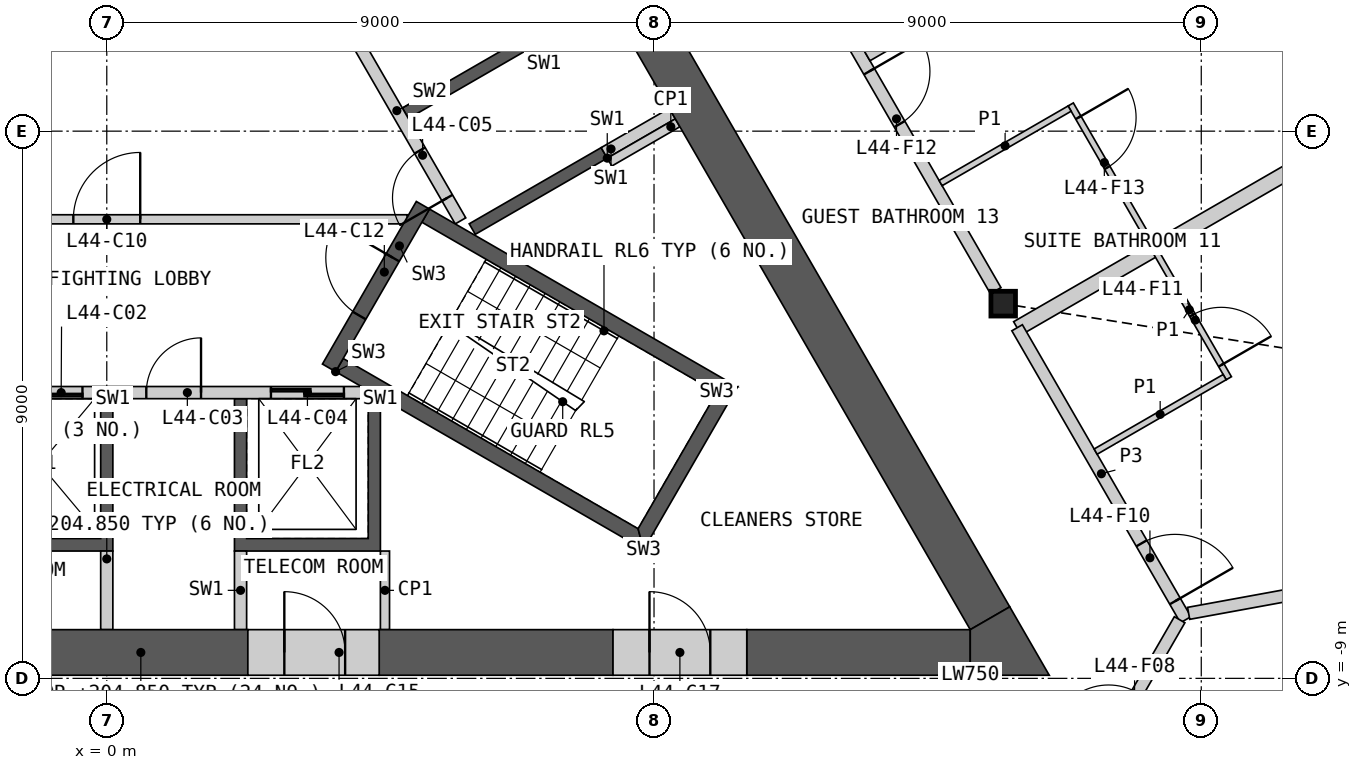
"""IFC4 building model, lengths in metres.
Left out: names, types, materials, properties, quantities, classifications, styles, units other than length and angle.
Written with IfcOpenShell. Run it as: python <this file> out.ifc"""

import sys

from ifc_helpers import new_model, si_unit, direction, frame, frame_2d, origin, origin_2d, place, context, subcontext, project, spatial, polyline, rectangle, i_section, outline, extrude, element, fill, save


model = new_model("IFC4")
c1 = context("Model", 3, precision=1e-05, world=origin(), true_north=direction((0.0, 1.0)))
c2 = subcontext(c1, "Body", "Model", "MODEL_VIEW")
j1 = project(units=[si_unit("LENGTHUNIT", "METRE"), si_unit("PLANEANGLEUNIT", "RADIAN")], contexts=[c1])
p1 = place(None, origin())
s1 = spatial("IfcSite", under=j1, at=p1, CompositionType="ELEMENT")
p2 = place(p1, origin())
s2 = spatial("IfcBuilding", under=s1, at=p2, CompositionType="ELEMENT")
p3 = place(p2, frame((0.0, 0.0, 201.6)))
s3 = spatial("IfcBuildingStorey", under=s2, at=p3, CompositionType="ELEMENT", Elevation=201.6)
p4 = place(p3, frame((14.743, -2.837, 0.0), z_axis=(0.0, 0.0, 1.0), x_axis=(1.0, 0.0, 0.0)))
e1 = element("IfcColumn", 1, at=p4, inside=s3, PredefinedType="COLUMN", context=c2, shape_type="SweptSolid", body=[
    extrude(i_section(OverallWidth=0.404, OverallDepth=0.407, WebThickness=0.027, FlangeThickness=0.044, at=origin_2d()), origin(), (0.0, 0.0, 1.0), 3.6),
])
p5 = place(p3, origin())
e2 = element("IfcWall", 2, at=p5, inside=s3, PredefinedType="SHEAR", context=c2, shape_type="SweptSolid", body=[
    extrude(outline(polyline([(4.5, -4.4), (4.5, -6.906), (2.1, -6.906), (2.1, -4.4), (2.3, -4.4), (2.3, -6.7), (4.3, -6.7), (4.3, -4.4), (4.5, -4.4)])), origin(), (0.0, 0.0, 1.0), 3.25),
])
p6 = place(p3, origin())
e3 = element("IfcWall", 3, at=p6, inside=s3, PredefinedType="SHEAR", context=c2, shape_type="SweptSolid", body=[
    extrude(outline(polyline([(0.1, -4.4), (0.1, -6.906), (-4.5, -6.906), (-4.5, -4.4), (-4.3, -4.4), (-4.3, -6.7), (-2.3, -6.7), (-2.3, -4.4), (-2.1, -4.4), (-2.1, -6.7), (-0.1, -6.7), (-0.1, -4.4), (0.1, -4.4)])), origin(), (0.0, 0.0, 1.0), 3.25),
])
p7 = place(p3, frame((-4.187, -4.3, 0.0), z_axis=(0.0, 0.0, 1.0), x_axis=(1.0, 0.0, 0.0)))
e4 = element("IfcWall", 4, at=p7, inside=s3, PredefinedType="SOLIDWALL", context=c2, shape_type="SweptSolid", body=[
    extrude(rectangle(XDim=8.373, YDim=0.2, at=frame_2d((4.187, 0.0))), origin(), (0.0, 0.0, 1.0), 3.25),
])
p8 = place(p7, frame((0.287, 0.0, 0.0)))
e5 = element("IfcOpeningElement", 5, at=p8, cuts=e4, PredefinedType="OPENING", context=c2, shape_type="SweptSolid", body=[
    extrude(rectangle(XDim=1.2, YDim=2.1, at=frame_2d((0.6, 1.05))), frame((0.0, 0.11, 0.0), z_axis=(0.0, -1.0, 0.0), x_axis=(1.0, 0.0, 0.0)), (0.0, 0.0, 1.0), 0.22),
])
p9 = place(p7, frame((2.387, 0.0, 0.0)))
e6 = element("IfcOpeningElement", 6, at=p9, cuts=e4, PredefinedType="OPENING", context=c2, shape_type="SweptSolid", body=[
    extrude(rectangle(XDim=1.4, YDim=2.1, at=frame_2d((0.7, 1.05))), frame((0.0, 0.11, 0.0), z_axis=(0.0, -1.0, 0.0), x_axis=(1.0, 0.0, 0.0)), (0.0, 0.0, 1.0), 0.22),
])
p10 = place(p7, frame((4.837, 0.0, 0.0)))
e7 = element("IfcOpeningElement", 7, at=p10, cuts=e4, PredefinedType="OPENING", context=c2, shape_type="SweptSolid", body=[
    extrude(rectangle(XDim=0.9, YDim=2.1, at=frame_2d((0.45, 1.05))), frame((0.0, 0.11, 0.0), z_axis=(0.0, -1.0, 0.0), x_axis=(1.0, 0.0, 0.0)), (0.0, 0.0, 1.0), 0.22),
])
p11 = place(p7, frame((6.887, 0.0, 0.0)))
e8 = element("IfcOpeningElement", 8, at=p11, cuts=e4, PredefinedType="OPENING", context=c2, shape_type="SweptSolid", body=[
    extrude(rectangle(XDim=1.2, YDim=2.1, at=frame_2d((0.6, 1.05))), frame((0.0, 0.11, 0.0), z_axis=(0.0, -1.0, 0.0), x_axis=(1.0, 0.0, 0.0)), (0.0, 0.0, 1.0), 0.22),
])
for number, where, z_axis, x_axis in (
    (9, (0.0, -6.906, 0.0), (0.0, 0.0, 1.0), (0.0, -1.0, 0.0)),
    (10, (2.2, -6.906, 0.0), (0.0, 0.0, 1.0), (0.0, -1.0, 0.0)),
):
    element("IfcWall", number, at=place(p3, frame(where, z_axis=z_axis, x_axis=x_axis)), inside=s3, PredefinedType="SHEAR", context=c2, shape_type="SweptSolid", body=[
        extrude(rectangle(XDim=1.293, YDim=0.2, at=frame_2d((0.646, 0.0))), origin(), (0.0, 0.0, 1.0), 3.25),
    ])
p12 = place(p3, origin())
e11 = element("IfcWall", 11, at=p12, inside=s3, PredefinedType="SHEAR", context=c2, shape_type="SweptSolid", body=[
    extrude(outline(polyline([(1.561, 6.097), (3.731, 7.35), (7.131, 1.461), (4.96, 0.208), (4.861, 0.381), (6.852, 1.531), (4.752, 5.169), (2.76, 4.019), (2.66, 4.192), (4.652, 5.342), (3.652, 7.074), (1.66, 5.924), (1.561, 6.097)])), origin(), (0.0, 0.0, 1.0), 3.25),
])
p13 = place(p3, origin())
e12 = element("IfcWall", 12, at=p13, inside=s3, PredefinedType="SHEAR", context=c2, shape_type="SweptSolid", body=[
    extrude(outline(polyline([(8.231, -0.444), (6.061, -1.697), (5.96, -1.524), (8.131, -0.271), (8.231, -0.444)])), origin(), (0.0, 0.0, 1.0), 3.25),
])
p14 = place(p3, frame((5.817, -1.476, 0.0), z_axis=(0.0, 0.0, 1.0), x_axis=(-0.500002616675, 0.866023893041, 0.0)))
e13 = element("IfcWall", 13, at=p14, inside=s3, PredefinedType="SOLIDWALL", context=c2, shape_type="SweptSolid", body=[
    extrude(rectangle(XDim=8.373, YDim=0.2, at=frame_2d((4.187, 0.0))), origin(), (0.0, 0.0, 1.0), 3.25),
])
p15 = place(p14, frame((0.437, 0.0, 0.0)))
e14 = element("IfcOpeningElement", 14, at=p15, cuts=e13, PredefinedType="OPENING", context=c2, shape_type="SweptSolid", body=[
    extrude(rectangle(XDim=0.9, YDim=2.1, at=frame_2d((0.45, 1.05))), frame((0.0, 0.11, 0.0), z_axis=(0.0, -1.0, 0.0), x_axis=(1.0, 0.0, 0.0)), (0.0, 0.0, 1.0), 0.22),
])
p16 = place(p14, frame((3.737, 0.0, 0.0)))
e15 = element("IfcOpeningElement", 15, at=p16, cuts=e13, PredefinedType="OPENING", context=c2, shape_type="SweptSolid", body=[
    extrude(rectangle(XDim=0.9, YDim=2.1, at=frame_2d((0.45, 1.05))), frame((0.0, 0.11, 0.0), z_axis=(0.0, -1.0, 0.0), x_axis=(1.0, 0.0, 0.0)), (0.0, 0.0, 1.0), 0.22),
])
p17 = place(p14, frame((6.937, 0.0, 0.0)))
e16 = element("IfcOpeningElement", 16, at=p17, cuts=e13, PredefinedType="OPENING", context=c2, shape_type="SweptSolid", body=[
    extrude(rectangle(XDim=1.1, YDim=2.1, at=frame_2d((0.55, 1.05))), frame((0.0, 0.11, 0.0), z_axis=(0.0, -1.0, 0.0), x_axis=(1.0, 0.0, 0.0)), (0.0, 0.0, 1.0), 0.22),
])
p18 = place(p3, frame((8.181, -0.357, 0.0), z_axis=(0.0, 0.0, 1.0), x_axis=(0.866003189247, 0.500038474733, 0.0)))
e17 = element("IfcWall", 17, at=p18, inside=s3, PredefinedType="SHEAR", context=c2, shape_type="SweptSolid", body=[
    extrude(rectangle(XDim=1.293, YDim=0.2, at=frame_2d((0.646, 0.0))), origin(), (0.0, 0.0, 1.0), 3.25),
])
p19 = place(p3, frame((-4.941, -1.45, 0.0), z_axis=(0.0, 0.0, 1.0), x_axis=(1.0, 0.0, 0.0)))
e18 = element("IfcWall", 18, at=p19, inside=s3, PredefinedType="PARTITIONING", context=c2, shape_type="SweptSolid", body=[
    extrude(rectangle(XDim=9.882, YDim=0.15, at=frame_2d((4.941, 0.0))), origin(), (0.0, 0.0, 1.0), 3.25),
])
p20 = place(p19, frame((4.391, 0.0, 0.0)))
e19 = element("IfcOpeningElement", 19, at=p20, cuts=e18, PredefinedType="OPENING", context=c2, shape_type="SweptSolid", body=[
    extrude(rectangle(XDim=1.1, YDim=2.1, at=frame_2d((0.55, 1.05))), frame((0.0, 0.085, 0.0), z_axis=(0.0, -1.0, 0.0), x_axis=(1.0, 0.0, 0.0)), (0.0, 0.0, 1.0), 0.17),
])
p21 = place(p3, origin())
e20 = element("IfcWall", 20, at=p21, inside=s3, PredefinedType="SHEAR", context=c2, shape_type="SweptSolid", body=[
    extrude(outline(polyline([(3.763, -3.956), (8.83, -6.881), (8.738, -6.539), (3.888, -3.739), (3.763, -3.956)])), origin(), (0.0, 0.0, 1.0), 3.25),
])
p22 = place(p3, origin())
e21 = element("IfcWall", 21, at=p22, inside=s3, PredefinedType="SHEAR", context=c2, shape_type="SweptSolid", body=[
    extrude(outline(polyline([(8.83, -6.881), (10.374, -4.206), (10.032, -4.298), (8.738, -6.539), (8.83, -6.881)])), origin(), (0.0, 0.0, 1.0), 3.25),
])
p23 = place(p3, origin())
e22 = element("IfcWall", 22, at=p23, inside=s3, PredefinedType="SHEAR", context=c2, shape_type="SweptSolid", body=[
    extrude(outline(polyline([(10.032, -4.298), (10.374, -4.206), (5.307, -1.281), (5.182, -1.498), (10.032, -4.298)])), origin(), (0.0, 0.0, 1.0), 3.25),
])
p24 = place(p3, frame((3.655, -3.893, 0.0), z_axis=(0.0, 0.0, 1.0), x_axis=(0.499982516597, 0.866035497597, 0.0)))
e23 = element("IfcWall", 23, at=p24, inside=s3, PredefinedType="SHEAR", context=c2, shape_type="SweptSolid", body=[
    extrude(rectangle(XDim=3.088, YDim=0.25, at=frame_2d((1.544, 0.0))), origin(), (0.0, 0.0, 1.0), 3.25),
])
p25 = place(p24, frame((0.994, 0.0, 0.0)))
e24 = element("IfcOpeningElement", 24, at=p25, cuts=e23, PredefinedType="OPENING", context=c2, shape_type="SweptSolid", body=[
    extrude(rectangle(XDim=1.1, YDim=2.1, at=frame_2d((0.55, 1.05))), frame((0.0, 0.135, 0.0), z_axis=(0.0, -1.0, 0.0), x_axis=(1.0, 0.0, 0.0)), (0.0, 0.0, 1.0), 0.27),
])
for number, where, z_axis, x_axis in (
    (25, (4.575, -6.906, 0.0), (0.0, 0.0, 1.0), (0.0, -1.0, 0.0)),
    (26, (8.268, -0.509, 0.0), (0.0, 0.0, 1.0), (0.866, 0.5, 0.0)),
):
    element("IfcWall", number, at=place(p3, frame(where, z_axis=z_axis, x_axis=x_axis)), inside=s3, PredefinedType="PARTITIONING", context=c2, shape_type="SweptSolid", body=[
        extrude(rectangle(XDim=1.293, YDim=0.15, at=frame_2d((0.646, 0.0))), origin(), (0.0, 0.0, 1.0), 3.25),
    ])
p26 = place(p3, frame((4.48, -8.574, 0.0), z_axis=(0.0, 0.0, 1.0), x_axis=(1.0, 0.0, 0.0)))
e27 = element("IfcWall", 27, at=p26, inside=s3, PredefinedType="SHEAR", context=c2, shape_type="SweptSolid", body=[
    extrude(rectangle(XDim=3.845, YDim=0.75, at=frame_2d((1.923, 0.0))), origin(), (0.0, 0.0, 1.0), 3.25),
])
p27 = place(p3, frame((10.525, -8.574, 0.0), z_axis=(0.0, 0.0, 1.0), x_axis=(1.0, 0.0, 0.0)))
e28 = element("IfcWall", 28, at=p27, inside=s3, PredefinedType="SHEAR", context=c2, shape_type="SweptSolid", body=[
    extrude(rectangle(XDim=3.676, YDim=0.75, at=frame_2d((1.838, 0.0))), origin(), (0.0, 0.0, 1.0), 3.25),
])
p28 = place(p3, frame((-1.2, -8.574, 0.0), z_axis=(0.0, 0.0, 1.0), x_axis=(1.0, 0.0, 0.0)))
e29 = element("IfcWall", 29, at=p28, inside=s3, PredefinedType="SHEAR", context=c2, shape_type="SweptSolid", body=[
    extrude(rectangle(XDim=3.52, YDim=0.75, at=frame_2d((1.76, 0.0))), origin(), (0.0, 0.0, 1.0), 3.25),
])
p29 = place(p3, frame((14.526, -8.011, 0.0), z_axis=(0.0, 0.0, 1.0), x_axis=(-0.499996012963, 0.866027705689, 0.0)))
e30 = element("IfcWall", 30, at=p29, inside=s3, PredefinedType="SHEAR", context=c2, shape_type="SweptSolid", body=[
    extrude(rectangle(XDim=15.039, YDim=0.75, at=frame_2d((7.519, 0.0))), origin(), (0.0, 0.0, 1.0), 3.25),
])
p30 = place(p3, origin())
e31 = element("IfcWall", 31, at=p30, inside=s3, PredefinedType="SHEAR", context=c2, shape_type="SweptSolid", body=[
    extrude(outline(polyline([(14.201, -8.949), (14.201, -8.199), (14.851, -7.824), (15.5, -8.949), (14.201, -8.949)])), origin(), (0.0, 0.0, 1.0), 3.25),
])
p31 = place(p3, frame((2.32, -8.574, 0.0), z_axis=(0.0, 0.0, 1.0), x_axis=(1.0, 0.0, 0.0)))
e32 = element("IfcWall", 32, at=p31, inside=s3, PredefinedType="SHEAR", context=c2, shape_type="SweptSolid", body=[
    extrude(rectangle(XDim=2.16, YDim=0.75, at=frame_2d((1.08, 0.0))), origin(), (0.0, 0.0, 1.0), 3.25),
])
p32 = place(p31, frame((0.6, 0.0, 0.0)))
e33 = element("IfcOpeningElement", 33, at=p32, cuts=e32, PredefinedType="OPENING", context=c2, shape_type="SweptSolid", body=[
    extrude(rectangle(XDim=1.0, YDim=2.1, at=frame_2d((0.5, 1.05))), frame((0.0, 0.385, 0.0), z_axis=(0.0, -1.0, 0.0), x_axis=(1.0, 0.0, 0.0)), (0.0, 0.0, 1.0), 0.77),
])
p33 = place(p3, frame((8.325, -8.574, 0.0), z_axis=(0.0, 0.0, 1.0), x_axis=(1.0, 0.0, 0.0)))
e34 = element("IfcWall", 34, at=p33, inside=s3, PredefinedType="SHEAR", context=c2, shape_type="SweptSolid", body=[
    extrude(rectangle(XDim=2.2, YDim=0.75, at=frame_2d((1.1, 0.0))), origin(), (0.0, 0.0, 1.0), 3.25),
])
p34 = place(p33, frame((0.6, 0.0, 0.0)))
e35 = element("IfcOpeningElement", 35, at=p34, cuts=e34, PredefinedType="OPENING", context=c2, shape_type="SweptSolid", body=[
    extrude(rectangle(XDim=1.0, YDim=2.1, at=frame_2d((0.5, 1.05))), frame((0.0, 0.385, 0.0), z_axis=(0.0, -1.0, 0.0), x_axis=(1.0, 0.0, 0.0)), (0.0, 0.0, 1.0), 0.77),
])
p35 = place(p3, frame((14.977, -3.242, 0.0), z_axis=(0.0, 0.0, 1.0), x_axis=(0.866026026416, 0.499998921569, 0.0)))
e36 = element("IfcWall", 36, at=p35, inside=s3, PredefinedType="PARTITIONING", context=c2, shape_type="SweptSolid", body=[
    extrude(rectangle(XDim=12.918, YDim=0.25, at=frame_2d((6.459, 0.0))), origin(), (0.0, 0.0, 1.0), 2.404),
])
p36 = place(p3, frame((9.952, 5.461, 0.0), z_axis=(0.0, 0.0, 1.0), x_axis=(0.50000393355, -0.866023132736, 0.0)))
e37 = element("IfcWall", 37, at=p36, inside=s3, PredefinedType="PARTITIONING", context=c2, shape_type="SweptSolid", body=[
    extrude(rectangle(XDim=9.335, YDim=0.2, at=frame_2d((4.667, 0.0))), origin(), (0.0, 0.0, 1.0), 3.25),
])
p37 = place(p36, frame((5.172, 0.0, 0.0)))
e38 = element("IfcOpeningElement", 38, at=p37, cuts=e37, PredefinedType="OPENING", context=c2, shape_type="SweptSolid", body=[
    extrude(rectangle(XDim=1.0, YDim=2.1, at=frame_2d((0.5, 1.05))), frame((0.0, 0.11, 0.0), z_axis=(0.0, -1.0, 0.0), x_axis=(1.0, 0.0, 0.0)), (0.0, 0.0, 1.0), 0.22),
])
p38 = place(p36, frame((3.565, 0.0, 0.0)))
e39 = element("IfcOpeningElement", 39, at=p38, cuts=e37, PredefinedType="OPENING", context=c2, shape_type="SweptSolid", body=[
    extrude(rectangle(XDim=1.0, YDim=2.1, at=frame_2d((0.5, 1.05))), frame((0.0, 0.11, 0.0), z_axis=(0.0, -1.0, 0.0), x_axis=(1.0, 0.0, 0.0)), (0.0, 0.0, 1.0), 0.22),
])
p39 = place(p3, frame((12.489, 1.266, 0.0), z_axis=(0.0, 0.0, 1.0), x_axis=(0.866026623601, 0.49999788721, 0.0)))
e40 = element("IfcWall", 40, at=p39, inside=s3, PredefinedType="PARTITIONING", context=c2, shape_type="SweptSolid", body=[
    extrude(rectangle(XDim=8.159, YDim=0.25, at=frame_2d((4.079, 0.0))), origin(), (0.0, 0.0, 1.0), 2.404),
])
p40 = place(p3, frame((14.971, -3.233, 0.0), z_axis=(0.0, 0.0, 1.0), x_axis=(0.500003221507, -0.866023543838, 0.0)))
e41 = element("IfcWall", 41, at=p40, inside=s3, PredefinedType="PARTITIONING", context=c2, shape_type="SweptSolid", body=[
    extrude(rectangle(XDim=5.545, YDim=0.2, at=frame_2d((2.772, 0.0))), origin(), (0.0, 0.0, 1.0), 3.25),
])
p41 = place(p40, frame((4.094, 0.0, 0.0)))
e42 = element("IfcOpeningElement", 42, at=p41, cuts=e41, PredefinedType="OPENING", context=c2, shape_type="SweptSolid", body=[
    extrude(rectangle(XDim=1.1, YDim=2.1, at=frame_2d((0.55, 1.05))), frame((0.0, 0.11, 0.0), z_axis=(0.0, -1.0, 0.0), x_axis=(1.0, 0.0, 0.0)), (0.0, 0.0, 1.0), 0.22),
])
p42 = place(p3, frame((15.731, -11.349, 0.0), z_axis=(0.0, 0.0, 1.0), x_axis=(0.499961815444, 0.866047448526, 0.0)))
e43 = element("IfcWall", 43, at=p42, inside=s3, PredefinedType="PARTITIONING", context=c2, shape_type="SweptSolid", body=[
    extrude(rectangle(XDim=3.826, YDim=0.2, at=frame_2d((1.913, 0.0))), origin(), (0.0, 0.0, 1.0), 3.25),
])
p43 = place(p42, frame((1.49, 0.0, 0.0)))
e44 = element("IfcOpeningElement", 44, at=p43, cuts=e43, PredefinedType="OPENING", context=c2, shape_type="SweptSolid", body=[
    extrude(rectangle(XDim=0.95, YDim=2.1, at=frame_2d((0.475, 1.05))), frame((0.0, 0.11, 0.0), z_axis=(0.0, -1.0, 0.0), x_axis=(1.0, 0.0, 0.0)), (0.0, 0.0, 1.0), 0.22),
])
p44 = place(p3, frame((17.792, -7.931, 0.0), z_axis=(0.0, 0.0, 1.0), x_axis=(0.983720538919, 0.179705039744, 0.0)))
e45 = element("IfcWall", 45, at=p44, inside=s3, PredefinedType="PARTITIONING", context=c2, shape_type="SweptSolid", body=[
    extrude(rectangle(XDim=13.761, YDim=0.2, at=frame_2d((6.88, 0.0))), origin(), (0.0, 0.0, 1.0), 2.404),
])
p45 = place(p3, frame((15.853, 0.439, 0.0), z_axis=(0.0, 0.0, 1.0), x_axis=(0.499971721724, -0.866041729639, 0.0)))
e46 = element("IfcWall", 46, at=p45, inside=s3, PredefinedType="PARTITIONING", context=c2, shape_type="SweptSolid", body=[
    extrude(rectangle(XDim=5.2, YDim=0.1, at=frame_2d((2.6, 0.0))), origin(), (0.0, 0.0, 1.0), 2.404),
])
p46 = place(p45, frame((4.0, 0.0, 0.0)))
e47 = element("IfcOpeningElement", 47, at=p46, cuts=e46, PredefinedType="OPENING", context=c2, shape_type="SweptSolid", body=[
    extrude(rectangle(XDim=0.95, YDim=2.1, at=frame_2d((0.475, 1.05))), frame((0.0, 0.06, 0.0), z_axis=(0.0, -1.0, 0.0), x_axis=(1.0, 0.0, 0.0)), (0.0, 0.0, 1.0), 0.12),
])
p47 = place(p45, frame((0.25, 0.0, 0.0)))
e48 = element("IfcOpeningElement", 48, at=p47, cuts=e46, PredefinedType="OPENING", context=c2, shape_type="SweptSolid", body=[
    extrude(rectangle(XDim=0.95, YDim=2.1, at=frame_2d((0.475, 1.05))), frame((0.0, 0.06, 0.0), z_axis=(0.0, -1.0, 0.0), x_axis=(1.0, 0.0, 0.0)), (0.0, 0.0, 1.0), 0.12),
])
p48 = place(p3, frame((13.713, -0.854, 0.0), z_axis=(0.0, 0.0, 1.0), x_axis=(0.866014668023, 0.500018594424, 0.0)))
e49 = element("IfcWall", 49, at=p48, inside=s3, PredefinedType="PARTITIONING", context=c2, shape_type="SweptSolid", body=[
    extrude(rectangle(XDim=2.45, YDim=0.1, at=frame_2d((1.225, 0.0))), origin(), (0.0, 0.0, 1.0), 2.404),
])
p49 = place(p3, frame((16.263, -5.271, 0.0), z_axis=(0.0, 0.0, 1.0), x_axis=(0.866057815567, 0.499943856944, 0.0)))
e50 = element("IfcWall", 50, at=p49, inside=s3, PredefinedType="PARTITIONING", context=c2, shape_type="SweptSolid", body=[
    extrude(rectangle(XDim=2.45, YDim=0.1, at=frame_2d((1.225, 0.0))), origin(), (0.0, 0.0, 1.0), 2.404),
])
p50 = place(p9, origin())
e51 = element("IfcDoor", 51, at=p50, inside=s3, OperationType="SLIDING_TO_LEFT", PredefinedType="DOOR", context=c2, shape_type="SweptSolid", body=[
    extrude(rectangle(XDim=1.4, YDim=2.1, at=frame_2d((0.7, 1.05))), frame((0.0, 0.025, 0.0), z_axis=(0.0, -1.0, 0.0), x_axis=(1.0, 0.0, 0.0)), (0.0, 0.0, 1.0), 0.05),
])
fill(e6, e51)
p51 = place(p10, origin())
e52 = element("IfcDoor", 52, at=p51, inside=s3, OperationType="SINGLE_SWING_RIGHT", PredefinedType="DOOR", context=c2, shape_type="SweptSolid", body=[
    extrude(rectangle(XDim=0.9, YDim=2.1, at=frame_2d((0.45, 1.05))), frame((0.0, 0.025, 0.0), z_axis=(0.0, -1.0, 0.0), x_axis=(1.0, 0.0, 0.0)), (0.0, 0.0, 1.0), 0.05),
])
fill(e7, e52)
p52 = place(p11, origin())
e53 = element("IfcDoor", 53, at=p52, inside=s3, OperationType="SLIDING_TO_LEFT", PredefinedType="DOOR", context=c2, shape_type="SweptSolid", body=[
    extrude(rectangle(XDim=1.2, YDim=2.1, at=frame_2d((0.6, 1.05))), frame((0.0, 0.025, 0.0), z_axis=(0.0, -1.0, 0.0), x_axis=(1.0, 0.0, 0.0)), (0.0, 0.0, 1.0), 0.05),
])
fill(e8, e53)
p53 = place(p15, origin())
e54 = element("IfcDoor", 54, at=p53, inside=s3, OperationType="SINGLE_SWING_LEFT", PredefinedType="DOOR", context=c2, shape_type="SweptSolid", body=[
    extrude(rectangle(XDim=0.9, YDim=2.1, at=frame_2d((0.45, 1.05))), frame((0.0, 0.025, 0.0), z_axis=(0.0, -1.0, 0.0), x_axis=(1.0, 0.0, 0.0)), (0.0, 0.0, 1.0), 0.05),
])
fill(e14, e54)
p54 = place(p20, origin())
e55 = element("IfcDoor", 55, at=p54, inside=s3, OperationType="SINGLE_SWING_RIGHT", PredefinedType="DOOR", context=c2, shape_type="SweptSolid", body=[
    extrude(rectangle(XDim=1.1, YDim=2.1, at=frame_2d((0.55, 1.05))), frame((0.0, 0.025, 0.0), z_axis=(0.0, -1.0, 0.0), x_axis=(1.0, 0.0, 0.0)), (0.0, 0.0, 1.0), 0.05),
])
fill(e19, e55)
p55 = place(p25, origin())
e56 = element("IfcDoor", 56, at=p55, inside=s3, OperationType="SINGLE_SWING_RIGHT", PredefinedType="DOOR", context=c2, shape_type="SweptSolid", body=[
    extrude(rectangle(XDim=1.1, YDim=2.1, at=frame_2d((0.55, 1.05))), frame((0.0, 0.025, 0.0), z_axis=(0.0, -1.0, 0.0), x_axis=(1.0, 0.0, 0.0)), (0.0, 0.0, 1.0), 0.05),
])
fill(e24, e56)
p56 = place(p32, origin())
e57 = element("IfcDoor", 57, at=p56, inside=s3, OperationType="SINGLE_SWING_LEFT", PredefinedType="DOOR", context=c2, shape_type="SweptSolid", body=[
    extrude(rectangle(XDim=1.0, YDim=2.1, at=frame_2d((0.5, 1.05))), frame((0.0, 0.13, 0.0), z_axis=(0.0, -1.0, 0.0), x_axis=(1.0, 0.0, 0.0)), (0.0, 0.0, 1.0), 0.05),
])
fill(e33, e57)
p57 = place(p34, origin())
e58 = element("IfcDoor", 58, at=p57, inside=s3, OperationType="SINGLE_SWING_LEFT", PredefinedType="DOOR", context=c2, shape_type="SweptSolid", body=[
    extrude(rectangle(XDim=1.0, YDim=2.1, at=frame_2d((0.5, 1.05))), frame((0.0, 0.13, 0.0), z_axis=(0.0, -1.0, 0.0), x_axis=(1.0, 0.0, 0.0)), (0.0, 0.0, 1.0), 0.05),
])
fill(e35, e58)
p58 = place(p41, origin())
e59 = element("IfcDoor", 59, at=p58, inside=s3, OperationType="SINGLE_SWING_RIGHT", PredefinedType="DOOR", context=c2, shape_type="SweptSolid", body=[
    extrude(rectangle(XDim=1.1, YDim=2.1, at=frame_2d((0.55, 1.05))), frame((0.0, 0.025, 0.0), z_axis=(0.0, -1.0, 0.0), x_axis=(1.0, 0.0, 0.0)), (0.0, 0.0, 1.0), 0.05),
])
fill(e42, e59)
p59 = place(p46, origin())
e60 = element("IfcDoor", 60, at=p59, inside=s3, OperationType="SINGLE_SWING_RIGHT", PredefinedType="DOOR", context=c2, shape_type="SweptSolid", body=[
    extrude(rectangle(XDim=0.95, YDim=2.1, at=frame_2d((0.475, 1.05))), frame((0.0, 0.025, 0.0), z_axis=(0.0, -1.0, 0.0), x_axis=(1.0, 0.0, 0.0)), (0.0, 0.0, 1.0), 0.05),
])
fill(e47, e60)
p60 = place(p37, origin())
e61 = element("IfcDoor", 61, at=p60, inside=s3, OperationType="SINGLE_SWING_LEFT", PredefinedType="DOOR", context=c2, shape_type="SweptSolid", body=[
    extrude(rectangle(XDim=1.0, YDim=2.1, at=frame_2d((0.5, 1.05))), frame((0.0, 0.025, 0.0), z_axis=(0.0, -1.0, 0.0), x_axis=(1.0, 0.0, 0.0)), (0.0, 0.0, 1.0), 0.05),
])
fill(e38, e61)
p61 = place(p47, origin())
e62 = element("IfcDoor", 62, at=p61, inside=s3, OperationType="SINGLE_SWING_LEFT", PredefinedType="DOOR", context=c2, shape_type="SweptSolid", body=[
    extrude(rectangle(XDim=0.95, YDim=2.1, at=frame_2d((0.475, 1.05))), frame((0.0, 0.025, 0.0), z_axis=(0.0, -1.0, 0.0), x_axis=(1.0, 0.0, 0.0)), (0.0, 0.0, 1.0), 0.05),
])
fill(e48, e62)
save(model, sys.argv[1])
